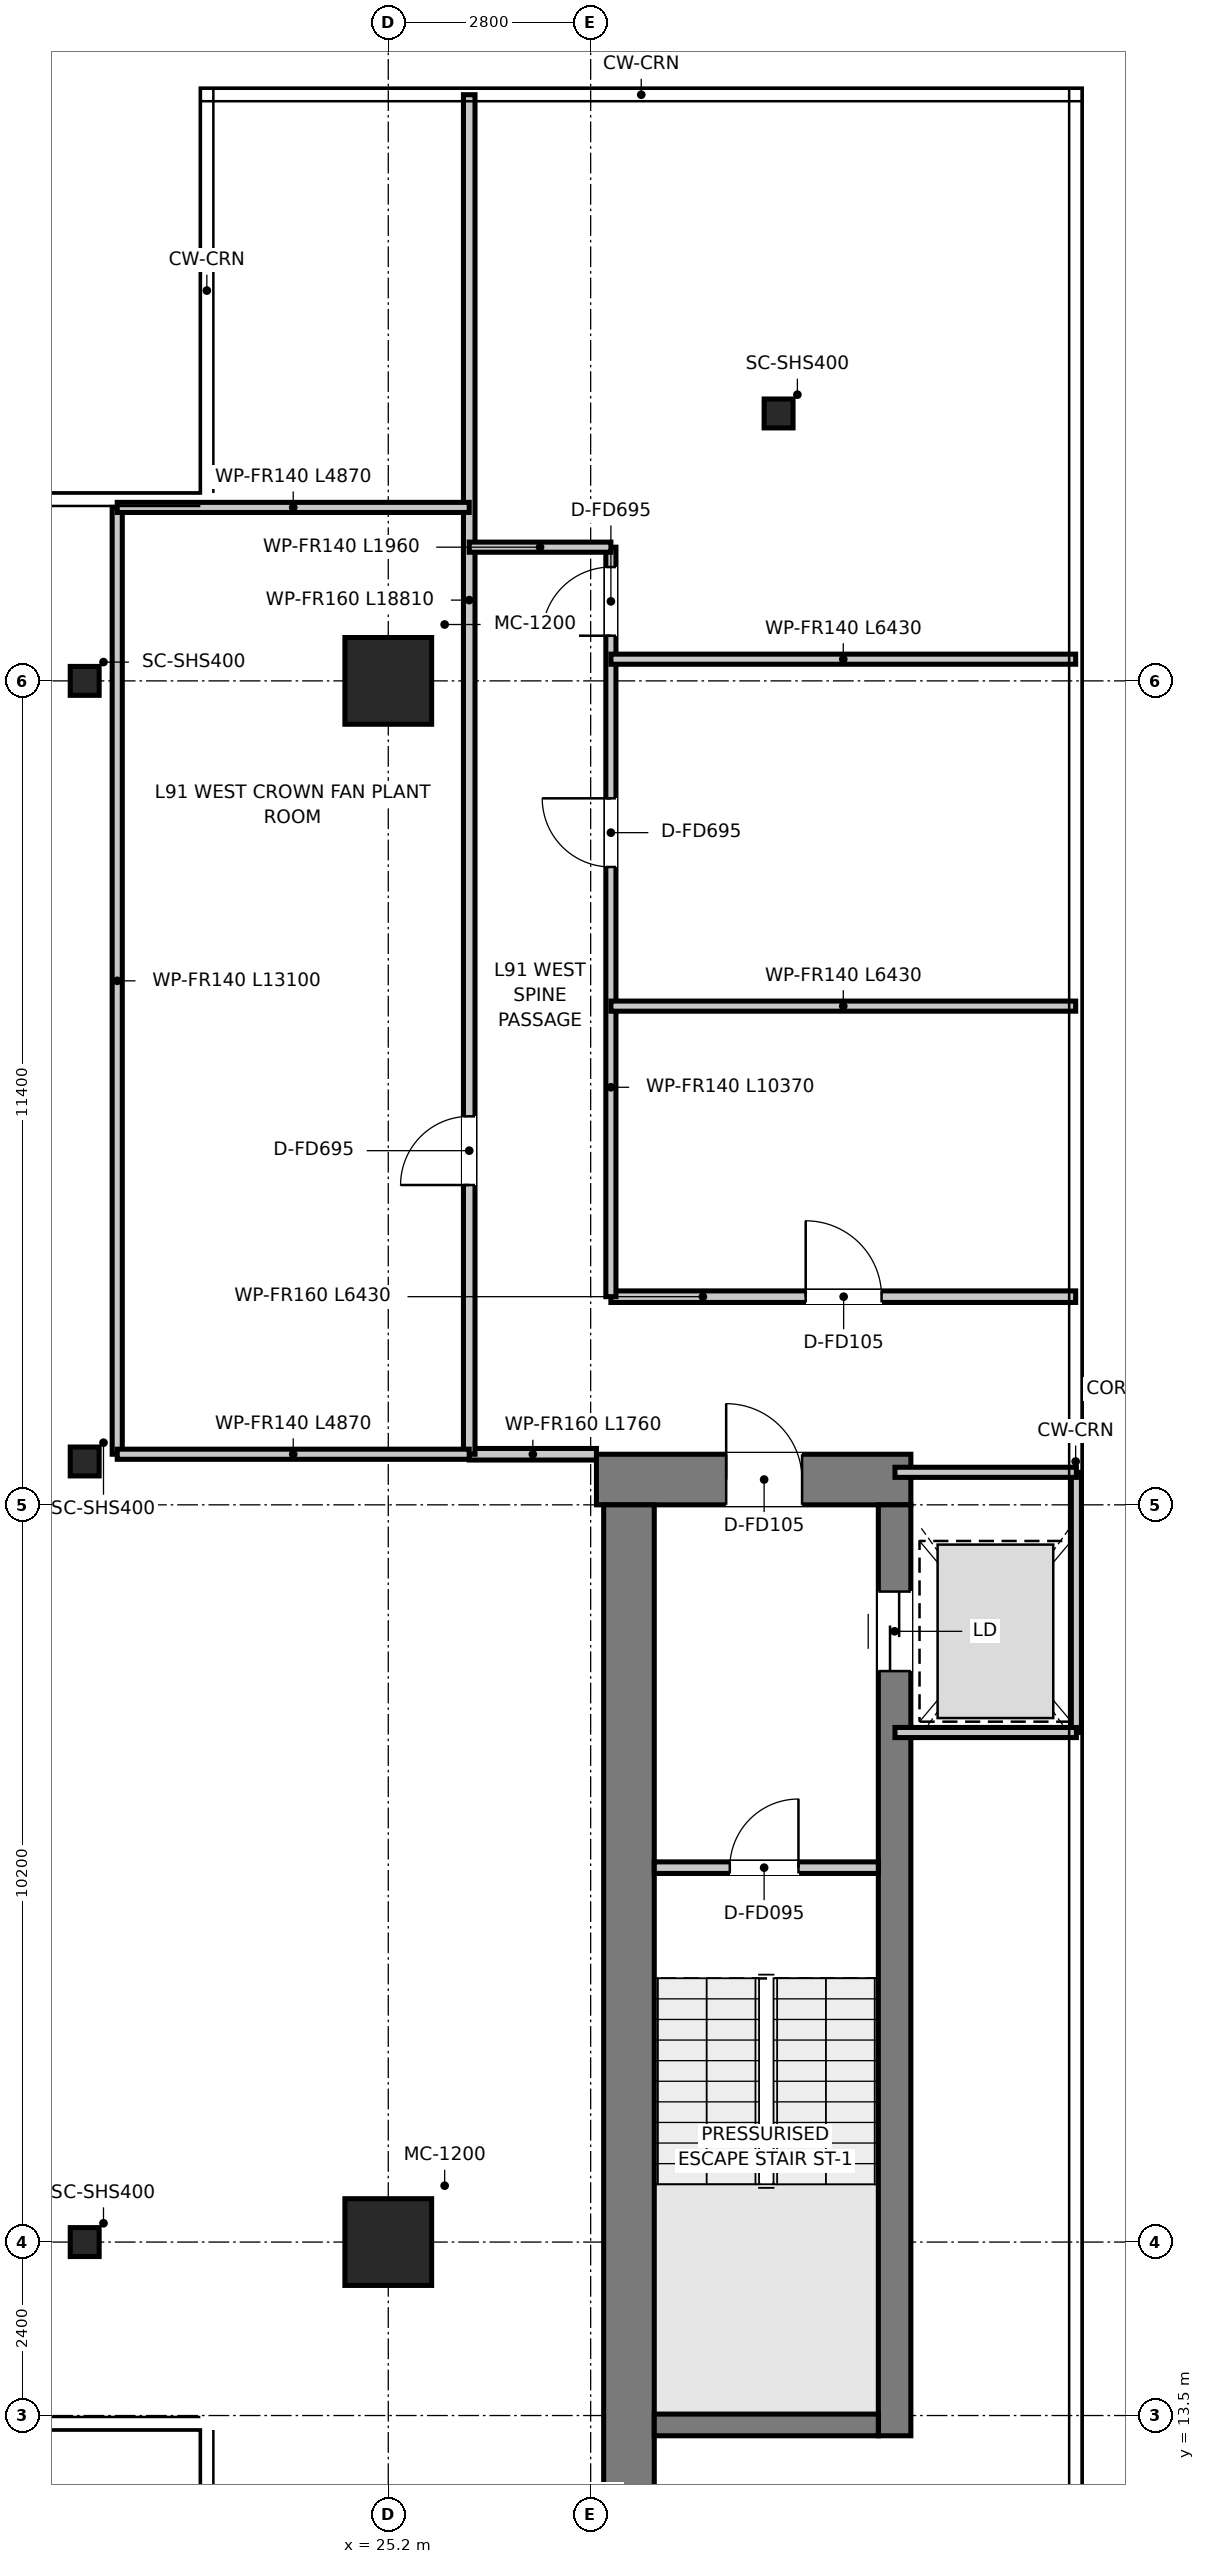
"""IFC4 building model, lengths in metres.
Left out: names, types, materials, properties, quantities, classifications, styles, units other than length and angle.
Written with IfcOpenShell. Run it as: python <this file> out.ifc"""

import sys

from ifc_helpers import new_model, si_unit, direction, frame, frame_2d, origin, origin_2d, place, context, subcontext, project, spatial, rectangle, hollow_rectangle, extrude, source, transform, mapped, element, fill, save


model = new_model("IFC4")
c1 = context("Model", 3, precision=1e-05, world=origin(), true_north=direction((0.0, 1.0)))
c2 = subcontext(c1, "Body", "Model", "MODEL_VIEW")
j1 = project(units=[si_unit("LENGTHUNIT", "METRE"), si_unit("PLANEANGLEUNIT", "RADIAN")], contexts=[c1])
p1 = place(None, origin())
s1 = spatial("IfcSite", under=j1, at=p1, CompositionType="ELEMENT")
p2 = place(p1, origin())
s2 = spatial("IfcBuilding", under=s1, at=p2, CompositionType="ELEMENT")
p3 = place(p2, frame((0.0, 0.0, 370.85)))
s3 = spatial("IfcBuildingStorey", under=s2, at=p3, CompositionType="ELEMENT", Elevation=370.85)
p4 = place(p3, frame((28.08, 26.45, 0.0), z_axis=(0.0, 0.0, 1.0), x_axis=(1.0, 0.0, 0.0)))
e1 = element("IfcWall", 1, at=p4, inside=s3, PredefinedType="SHEAR", context=c2, shape_type="SweptSolid", body=[
    extrude(rectangle(XDim=4.35, YDim=0.7, at=frame_2d((2.175, 0.0))), origin(), (0.0, 0.0, 1.0), 3.8),
])
p5 = place(p4, frame((1.795, 0.0, 0.0)))
e2 = element("IfcOpeningElement", 2, at=p5, cuts=e1, PredefinedType="OPENING", context=c2, shape_type="SweptSolid", body=[
    extrude(rectangle(XDim=1.05, YDim=2.1, at=frame_2d((0.525, 1.05))), frame((0.0, 0.36, 0.0), z_axis=(0.0, -1.0, 0.0), x_axis=(1.0, 0.0, 0.0)), (0.0, 0.0, 1.0), 0.72),
])
p6 = place(p3, frame((28.53, 11.2, 0.0), z_axis=(0.0, 0.0, 1.0), x_axis=(0.0, 1.0, 0.0)))
e3 = element("IfcWall", 3, at=p6, inside=s3, PredefinedType="SHEAR", context=c2, shape_type="SweptSolid", body=[
    extrude(rectangle(XDim=14.9, YDim=0.7, at=frame_2d((7.45, 0.0))), origin(), (0.0, 0.0, 1.0), 3.8),
])
p7 = place(p3, frame((32.205, 13.22, 0.0), z_axis=(0.0, 0.0, 1.0), x_axis=(0.0, 1.0, 0.0)))
e4 = element("IfcWall", 4, at=p7, inside=s3, PredefinedType="SHEAR", context=c2, shape_type="SweptSolid", body=[
    extrude(rectangle(XDim=12.88, YDim=0.45, at=frame_2d((6.44, 0.0))), origin(), (0.0, 0.0, 1.0), 3.8),
])
p8 = place(p7, frame((10.58, 0.0, 0.0)))
e5 = element("IfcOpeningElement", 5, at=p8, cuts=e4, PredefinedType="OPENING", context=c2, shape_type="SweptSolid", body=[
    extrude(rectangle(XDim=1.1, YDim=2.15, at=frame_2d((0.55, 1.075))), frame((0.0, 0.235, 0.0), z_axis=(0.0, -1.0, 0.0), x_axis=(1.0, 0.0, 0.0)), (0.0, 0.0, 1.0), 0.47),
])
p9 = place(p3, frame((28.88, 13.37, 0.0), z_axis=(0.0, 0.0, 1.0), x_axis=(1.0, 0.0, 0.0)))
e6 = element("IfcWall", 6, at=p9, inside=s3, PredefinedType="SHEAR", context=c2, shape_type="SweptSolid", body=[
    extrude(rectangle(XDim=3.1, YDim=0.3, at=frame_2d((1.55, 0.0))), origin(), (0.0, 0.0, 1.0), 3.8),
])
m1 = source(origin(), c2, "Body", "SweptSolid", [
    extrude(rectangle(XDim=1.2, YDim=1.2, at=origin_2d()), origin(), (0.0, 0.0, 1.0), 3.8),
])
for number, where, z_axis, x_axis in (
    (7, (25.2, 15.9, 0.0), (0.0, 0.0, 1.0), (1.0, 0.0, 0.0)),
    (8, (25.2, 37.5, 0.0), (0.0, 0.0, 1.0), (1.0, 0.0, 0.0)),
):
    element("IfcColumn", number, at=place(p3, frame(where, z_axis=z_axis, x_axis=x_axis)), inside=s3, PredefinedType="USERDEFINED", context=c2, shape_type="MappedRepresentation", body=[
        mapped(m1, transform((0.0, 0.0, 0.0), x_axis=(1.0, 0.0, 0.0), y_axis=(0.0, 1.0, 0.0), z_axis=(0.0, 0.0, 1.0), scale=1.0)),
    ])
m2 = source(origin(), c2, "Body", "SweptSolid", [
    extrude(hollow_rectangle(XDim=0.4, YDim=0.4, WallThickness=0.025, at=origin_2d()), origin(), (0.0, 0.0, 1.0), 3.8),
])
for number, where, z_axis, x_axis in (
    (9, (21.0, 15.9, 0.0), (0.0, 0.0, 1.0), (1.0, 0.0, 0.0)),
    (10, (21.0, 26.7, 0.0), (0.0, 0.0, 1.0), (1.0, 0.0, 0.0)),
    (11, (21.0, 37.5, 0.0), (0.0, 0.0, 1.0), (1.0, 0.0, 0.0)),
    (12, (30.6, 41.2, 0.0), (0.0, 0.0, 1.0), (1.0, 0.0, 0.0)),
):
    element("IfcColumn", number, at=place(p3, frame(where, z_axis=z_axis, x_axis=x_axis)), inside=s3, PredefinedType="COLUMN", context=c2, shape_type="MappedRepresentation", body=[
        mapped(m2, transform((0.0, 0.0, 0.0), x_axis=(1.0, 0.0, 0.0), y_axis=(0.0, 1.0, 0.0), z_axis=(0.0, 0.0, 1.0), scale=1.0)),
    ])
p10 = place(p3, frame((28.88, 21.08, 0.0), z_axis=(0.0, 0.0, 1.0), x_axis=(1.0, 0.0, 0.0)))
e13 = element("IfcWall", 13, at=p10, inside=s3, PredefinedType="PARTITIONING", context=c2, shape_type="SweptSolid", body=[
    extrude(rectangle(XDim=3.1, YDim=0.16, at=frame_2d((1.55, 0.0))), origin(), (0.0, 0.0, 1.0), 3.5),
])
p11 = place(p10, frame((1.045, 0.0, 0.0)))
e14 = element("IfcOpeningElement", 14, at=p11, cuts=e13, PredefinedType="OPENING", context=c2, shape_type="SweptSolid", body=[
    extrude(rectangle(XDim=0.95, YDim=2.1, at=frame_2d((0.475, 1.05))), frame((0.0, 0.09, 0.0), z_axis=(0.0, -1.0, 0.0), x_axis=(1.0, 0.0, 0.0)), (0.0, 0.0, 1.0), 0.18),
])
p12 = place(p3, frame((34.72, 22.95, 0.0), z_axis=(0.0, 0.0, 1.0), x_axis=(0.0, 1.0, 0.0)))
e15 = element("IfcWall", 15, at=p12, inside=s3, PredefinedType="PARTITIONING", context=c2, shape_type="SweptSolid", body=[
    extrude(rectangle(XDim=3.6, YDim=0.14, at=frame_2d((1.8, 0.0))), origin(), (0.0, 0.0, 1.0), 3.5),
])
for number, where, z_axis, x_axis in (
    (16, (32.21, 22.95, 0.0), (0.0, 0.0, 1.0), (1.0, 0.0, 0.0)),
    (17, (32.21, 26.55, 0.0), (0.0, 0.0, 1.0), (1.0, 0.0, 0.0)),
):
    element("IfcWall", number, at=place(p3, frame(where, z_axis=z_axis, x_axis=x_axis)), inside=s3, PredefinedType="PARTITIONING", context=c2, shape_type="SweptSolid", body=[
        extrude(rectangle(XDim=2.51, YDim=0.14, at=frame_2d((1.255, 0.0))), origin(), (0.0, 0.0, 1.0), 3.5),
    ])
p13 = place(p3, frame((28.28, 28.98, 0.0), z_axis=(0.0, 0.0, 1.0), x_axis=(1.0, 0.0, 0.0)))
e18 = element("IfcWall", 18, at=p13, inside=s3, PredefinedType="PARTITIONING", context=c2, shape_type="SweptSolid", body=[
    extrude(rectangle(XDim=6.43, YDim=0.16, at=frame_2d((3.215, 0.0))), origin(), (0.0, 0.0, 1.0), 3.01),
])
p14 = place(p13, frame((2.695, 0.0, 0.0)))
e19 = element("IfcOpeningElement", 19, at=p14, cuts=e18, PredefinedType="OPENING", context=c2, shape_type="SweptSolid", body=[
    extrude(rectangle(XDim=1.05, YDim=2.1, at=frame_2d((0.525, 1.05))), frame((0.0, 0.09, 0.0), z_axis=(0.0, -1.0, 0.0), x_axis=(1.0, 0.0, 0.0)), (0.0, 0.0, 1.0), 0.18),
])
p15 = place(p3, frame((26.32, 26.8, 0.0), z_axis=(0.0, 0.0, 1.0), x_axis=(1.0, 0.0, 0.0)))
e20 = element("IfcWall", 20, at=p15, inside=s3, PredefinedType="PARTITIONING", context=c2, shape_type="SweptSolid", body=[
    extrude(rectangle(XDim=1.76, YDim=0.16, at=frame_2d((0.88, 0.0))), origin(), (0.0, 0.0, 1.0), 3.5),
])
p16 = place(p3, frame((26.32, 26.8, 0.0), z_axis=(0.0, 0.0, 1.0), x_axis=(0.0, 1.0, 0.0)))
e21 = element("IfcWall", 21, at=p16, inside=s3, PredefinedType="PARTITIONING", context=c2, shape_type="SweptSolid", body=[
    extrude(rectangle(XDim=18.81, YDim=0.16, at=frame_2d((9.405, 0.0))), origin(), (0.0, 0.0, 1.0), 3.01),
])
p17 = place(p16, frame((3.725, 0.0, 0.0)))
e22 = element("IfcOpeningElement", 22, at=p17, cuts=e21, PredefinedType="OPENING", context=c2, shape_type="SweptSolid", body=[
    extrude(rectangle(XDim=0.95, YDim=2.1, at=frame_2d((0.475, 1.05))), frame((0.0, 0.09, 0.0), z_axis=(0.0, -1.0, 0.0), x_axis=(1.0, 0.0, 0.0)), (0.0, 0.0, 1.0), 0.18),
])
p18 = place(p3, frame((21.45, 26.8, 0.0), z_axis=(0.0, 0.0, 1.0), x_axis=(0.0, 1.0, 0.0)))
e23 = element("IfcWall", 23, at=p18, inside=s3, PredefinedType="PARTITIONING", context=c2, shape_type="SweptSolid", body=[
    extrude(rectangle(XDim=13.1, YDim=0.14, at=frame_2d((6.55, 0.0))), origin(), (0.0, 0.0, 1.0), 3.01),
])
p19 = place(p3, frame((21.45, 26.8, 0.0), z_axis=(0.0, 0.0, 1.0), x_axis=(1.0, 0.0, 0.0)))
e24 = element("IfcWall", 24, at=p19, inside=s3, PredefinedType="PARTITIONING", context=c2, shape_type="SweptSolid", body=[
    extrude(rectangle(XDim=4.87, YDim=0.14, at=frame_2d((2.435, 0.0))), origin(), (0.0, 0.0, 1.0), 3.01),
])
p20 = place(p3, frame((21.45, 39.9, 0.0), z_axis=(0.0, 0.0, 1.0), x_axis=(1.0, 0.0, 0.0)))
e25 = element("IfcWall", 25, at=p20, inside=s3, PredefinedType="PARTITIONING", context=c2, shape_type="SweptSolid", body=[
    extrude(rectangle(XDim=4.87, YDim=0.14, at=frame_2d((2.435, 0.0))), origin(), (0.0, 0.0, 1.0), 3.5),
])
p21 = place(p3, frame((28.28, 28.98, 0.0), z_axis=(0.0, 0.0, 1.0), x_axis=(0.0, 1.0, 0.0)))
e26 = element("IfcWall", 26, at=p21, inside=s3, PredefinedType="PARTITIONING", context=c2, shape_type="SweptSolid", body=[
    extrude(rectangle(XDim=10.37, YDim=0.14, at=frame_2d((5.185, 0.0))), origin(), (0.0, 0.0, 1.0), 3.5),
])
p22 = place(p21, frame((5.945, 0.0, 0.0)))
e27 = element("IfcOpeningElement", 27, at=p22, cuts=e26, PredefinedType="OPENING", context=c2, shape_type="SweptSolid", body=[
    extrude(rectangle(XDim=0.95, YDim=2.1, at=frame_2d((0.475, 1.05))), frame((0.0, 0.08, 0.0), z_axis=(0.0, -1.0, 0.0), x_axis=(1.0, 0.0, 0.0)), (0.0, 0.0, 1.0), 0.16),
])
p23 = place(p21, frame((9.145, 0.0, 0.0)))
e28 = element("IfcOpeningElement", 28, at=p23, cuts=e26, PredefinedType="OPENING", context=c2, shape_type="SweptSolid", body=[
    extrude(rectangle(XDim=0.95, YDim=2.1, at=frame_2d((0.475, 1.05))), frame((0.0, 0.08, 0.0), z_axis=(0.0, -1.0, 0.0), x_axis=(1.0, 0.0, 0.0)), (0.0, 0.0, 1.0), 0.16),
])
for number, where, z_axis, x_axis in (
    (29, (28.28, 33.0, 0.0), (0.0, 0.0, 1.0), (1.0, 0.0, 0.0)),
    (30, (28.28, 37.8, 0.0), (0.0, 0.0, 1.0), (1.0, 0.0, 0.0)),
):
    element("IfcWall", number, at=place(p3, frame(where, z_axis=z_axis, x_axis=x_axis)), inside=s3, PredefinedType="PARTITIONING", context=c2, shape_type="SweptSolid", body=[
        extrude(rectangle(XDim=6.43, YDim=0.14, at=frame_2d((3.215, 0.0))), origin(), (0.0, 0.0, 1.0), 3.01),
    ])
p24 = place(p3, frame((26.32, 39.35, 0.0), z_axis=(0.0, 0.0, 1.0), x_axis=(1.0, 0.0, 0.0)))
e31 = element("IfcWall", 31, at=p24, inside=s3, PredefinedType="PARTITIONING", context=c2, shape_type="SweptSolid", body=[
    extrude(rectangle(XDim=1.96, YDim=0.14, at=frame_2d((0.98, 0.0))), origin(), (0.0, 0.0, 1.0), 3.01),
])
p25 = place(p11, origin())
e32 = element("IfcDoor", 32, at=p25, inside=s3, OperationType="SINGLE_SWING_RIGHT", PredefinedType="DOOR", context=c2, shape_type="SweptSolid", body=[
    extrude(rectangle(XDim=0.95, YDim=2.1, at=frame_2d((0.475, 1.05))), frame((0.0, 0.025, 0.0), z_axis=(0.0, -1.0, 0.0), x_axis=(1.0, 0.0, 0.0)), (0.0, 0.0, 1.0), 0.05),
])
fill(e14, e32)
p26 = place(p8, origin())
e33 = element("IfcDoor", 33, at=p26, inside=s3, OperationType="DOUBLE_DOOR_SLIDING", PredefinedType="DOOR", context=c2, shape_type="SweptSolid", body=[
    extrude(rectangle(XDim=1.1, YDim=2.15, at=frame_2d((0.55, 1.075))), frame((0.0, 0.025, 0.0), z_axis=(0.0, -1.0, 0.0), x_axis=(1.0, 0.0, 0.0)), (0.0, 0.0, 1.0), 0.05),
])
fill(e5, e33)
p27 = place(p5, origin())
e34 = element("IfcDoor", 34, at=p27, inside=s3, OperationType="SINGLE_SWING_LEFT", PredefinedType="DOOR", context=c2, shape_type="SweptSolid", body=[
    extrude(rectangle(XDim=1.05, YDim=2.1, at=frame_2d((0.525, 1.05))), frame((0.0, 0.025, 0.0), z_axis=(0.0, -1.0, 0.0), x_axis=(1.0, 0.0, 0.0)), (0.0, 0.0, 1.0), 0.05),
])
fill(e2, e34)
p28 = place(p14, origin())
e35 = element("IfcDoor", 35, at=p28, inside=s3, OperationType="SINGLE_SWING_LEFT", PredefinedType="DOOR", context=c2, shape_type="SweptSolid", body=[
    extrude(rectangle(XDim=1.05, YDim=2.1, at=frame_2d((0.525, 1.05))), frame((0.0, 0.025, 0.0), z_axis=(0.0, -1.0, 0.0), x_axis=(1.0, 0.0, 0.0)), (0.0, 0.0, 1.0), 0.05),
])
fill(e19, e35)
p29 = place(p22, origin())
e36 = element("IfcDoor", 36, at=p29, inside=s3, OperationType="SINGLE_SWING_RIGHT", PredefinedType="DOOR", context=c2, shape_type="SweptSolid", body=[
    extrude(rectangle(XDim=0.95, YDim=2.1, at=frame_2d((0.475, 1.05))), frame((0.0, 0.025, 0.0), z_axis=(0.0, -1.0, 0.0), x_axis=(1.0, 0.0, 0.0)), (0.0, 0.0, 1.0), 0.05),
])
fill(e27, e36)
p30 = place(p23, origin())
e37 = element("IfcDoor", 37, at=p30, inside=s3, OperationType="SINGLE_SWING_LEFT", PredefinedType="DOOR", context=c2, shape_type="SweptSolid", body=[
    extrude(rectangle(XDim=0.95, YDim=2.1, at=frame_2d((0.475, 1.05))), frame((0.0, 0.025, 0.0), z_axis=(0.0, -1.0, 0.0), x_axis=(1.0, 0.0, 0.0)), (0.0, 0.0, 1.0), 0.05),
])
fill(e28, e37)
p31 = place(p17, origin())
e38 = element("IfcDoor", 38, at=p31, inside=s3, OperationType="SINGLE_SWING_LEFT", PredefinedType="DOOR", context=c2, shape_type="SweptSolid", body=[
    extrude(rectangle(XDim=0.95, YDim=2.1, at=frame_2d((0.475, 1.05))), frame((0.0, 0.025, 0.0), z_axis=(0.0, -1.0, 0.0), x_axis=(1.0, 0.0, 0.0)), (0.0, 0.0, 1.0), 0.05),
])
fill(e22, e38)
save(model, sys.argv[1])
